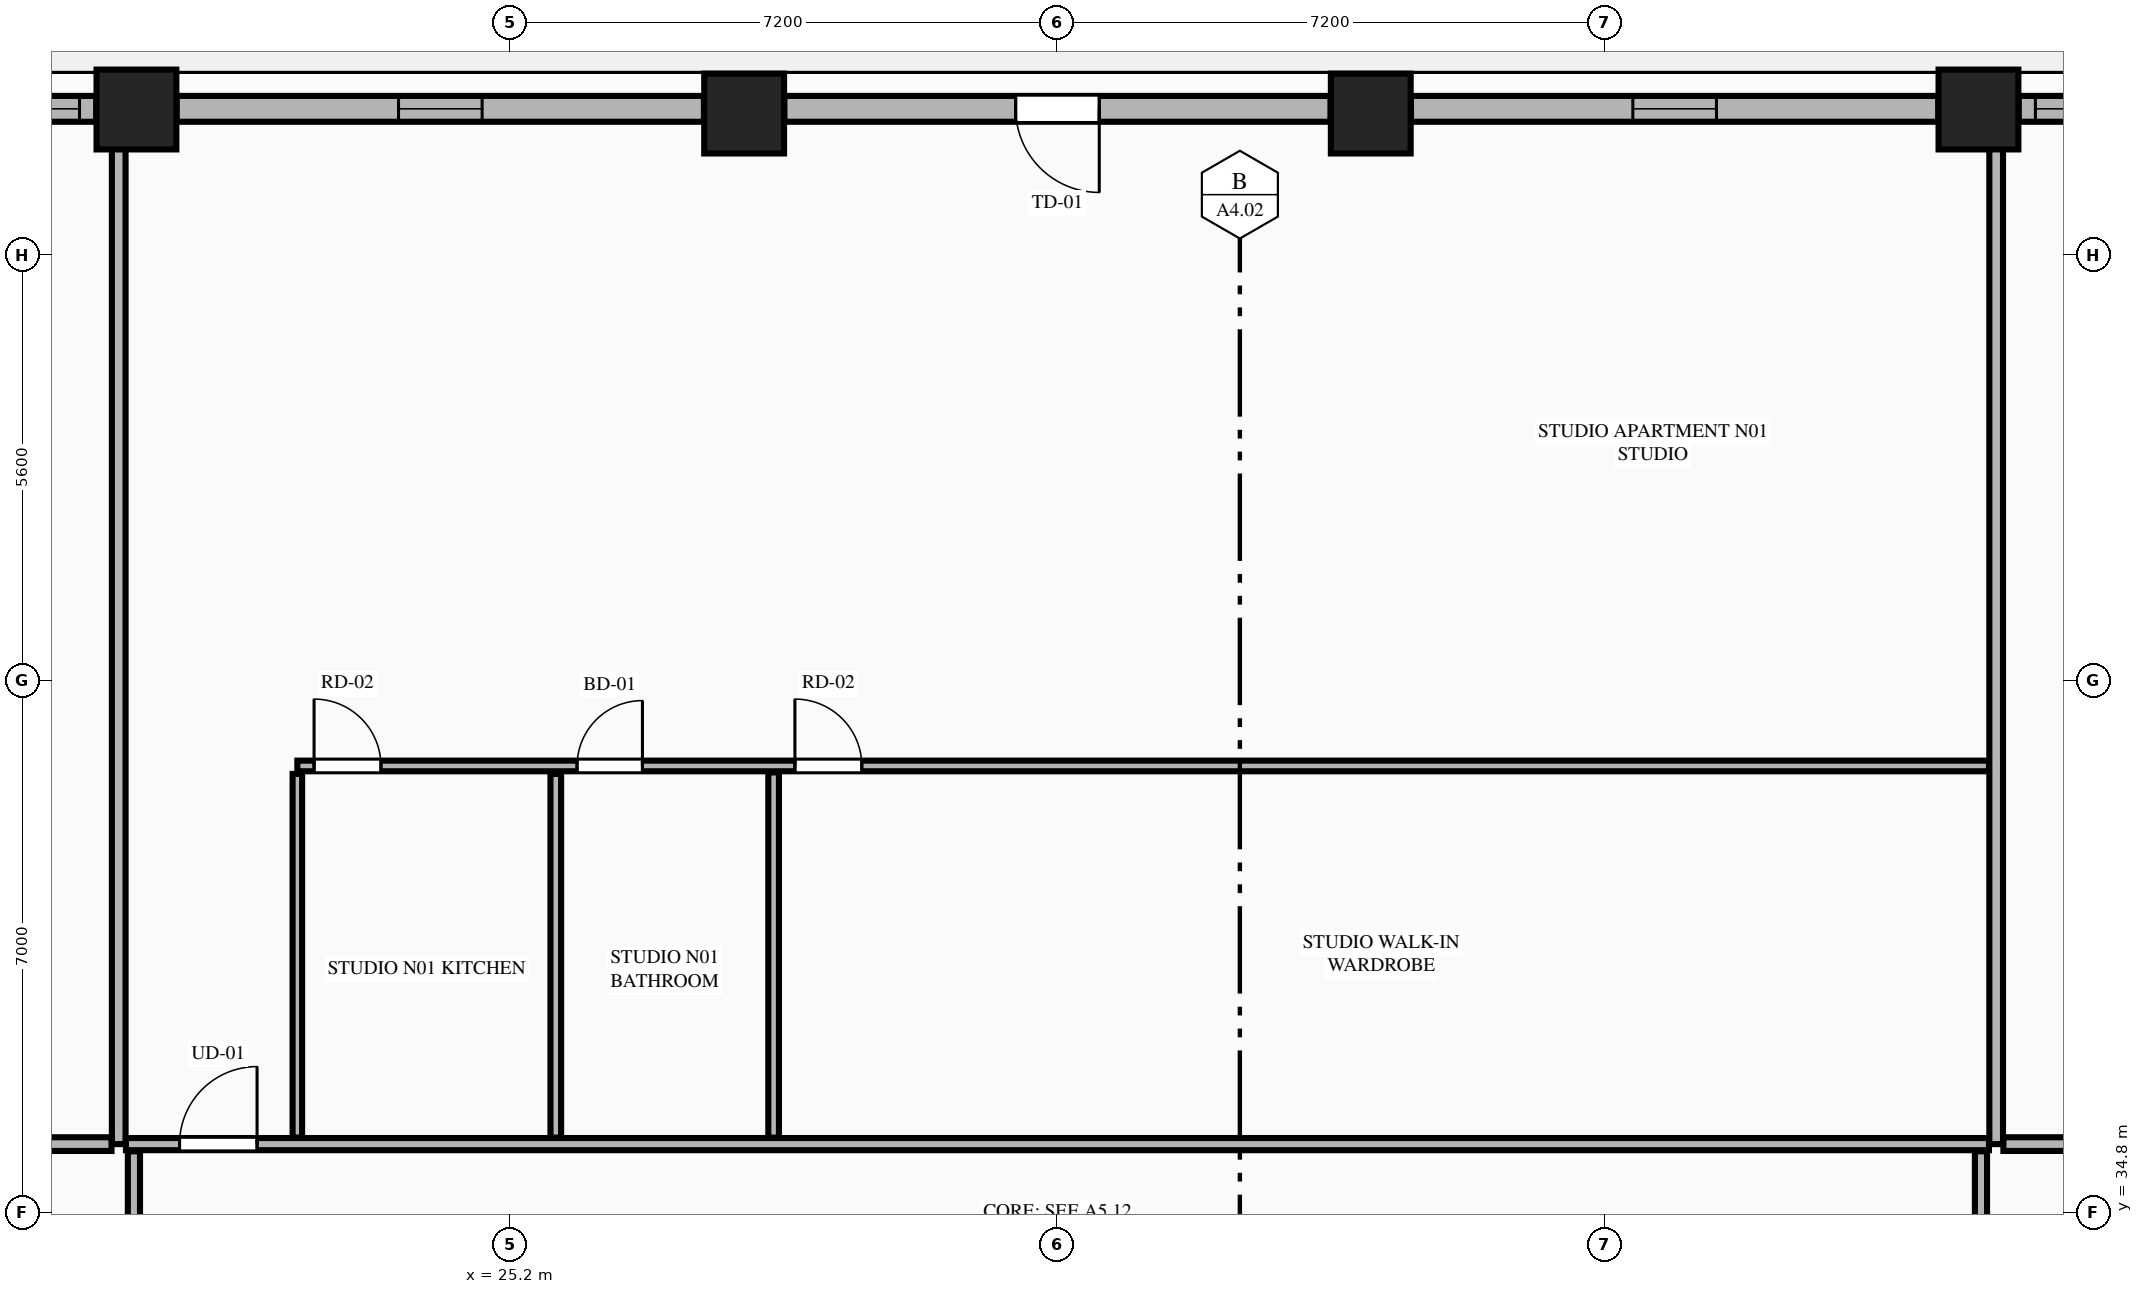
"""IFC4 building model, lengths in metres.
Left out: names, types, materials, properties, quantities, classifications, styles, units other than length and angle.
Written with IfcOpenShell. Run it as: python <this file> out.ifc"""

import sys

from ifc_helpers import new_model, si_unit, direction, frame, frame_2d, origin, origin_2d, place, context, subcontext, project, spatial, rectangle, extrude, element, fill, save


model = new_model("IFC4")
c1 = context("Model", 3, precision=1e-05, world=origin(), true_north=direction((0.0, 1.0)))
c2 = subcontext(c1, "Body", "Model", "MODEL_VIEW")
j1 = project(units=[si_unit("LENGTHUNIT", "METRE"), si_unit("PLANEANGLEUNIT", "RADIAN")], contexts=[c1])
p1 = place(None, origin())
s1 = spatial("IfcSite", under=j1, at=p1, CompositionType="ELEMENT")
p2 = place(p1, origin())
s2 = spatial("IfcBuilding", under=s1, at=p2, CompositionType="ELEMENT")
p3 = place(p2, frame((0.0, 0.0, 87.1)))
s3 = spatial("IfcBuildingStorey", under=s2, at=p3, CompositionType="ELEMENT", Elevation=87.1)
for number, where, z_axis, x_axis in (
    (1, (44.517, 49.311, 0.0), (0.0, 0.0, 1.0), (1.0, 0.0, 0.0)),
    (2, (36.522, 49.258, 0.0), (0.0, 0.0, 1.0), (1.0, 0.0, 0.0)),
    (3, (28.278, 49.258, 0.0), (0.0, 0.0, 1.0), (1.0, 0.0, 0.0)),
    (4, (20.283, 49.311, 0.0), (0.0, 0.0, 1.0), (1.0, 0.0, 0.0)),
):
    element("IfcColumn", number, at=place(p3, frame(where, z_axis=z_axis, x_axis=x_axis)), inside=s3, PredefinedType="COLUMN", context=c2, shape_type="SweptSolid", body=[
        extrude(rectangle(XDim=1.05, YDim=1.05, at=origin_2d()), origin(), (0.0, 0.0, 1.0), 3.55),
    ])
p4 = place(p3, frame((46.366, 49.32, 0.0), z_axis=(0.0, 0.0, 1.0), x_axis=(-1.0, 0.0, 0.0)))
e5 = element("IfcWall", 5, at=p4, inside=s3, PredefinedType="STANDARD", context=c2, shape_type="SweptSolid", body=[
    extrude(rectangle(XDim=1.32, YDim=0.34, at=frame_2d((0.66, 0.0))), origin(), (0.0, 0.0, 1.0), 3.33),
])
p5 = place(p4, frame((0.22, 0.0, 0.75)))
e6 = element("IfcOpeningElement", 6, at=p5, cuts=e5, PredefinedType="OPENING", context=c2, shape_type="SweptSolid", body=[
    extrude(rectangle(XDim=0.88, YDim=2.0, at=frame_2d((0.44, 1.0))), frame((0.0, 0.18, 0.0), z_axis=(0.0, -1.0, 0.0), x_axis=(1.0, 0.0, 0.0)), (0.0, 0.0, 1.0), 0.36),
])
p6 = place(p3, frame((43.988, 49.32, 0.0), z_axis=(0.0, 0.0, 1.0), x_axis=(-1.0, 0.0, 0.0)))
e7 = element("IfcWall", 7, at=p6, inside=s3, PredefinedType="STANDARD", context=c2, shape_type="SweptSolid", body=[
    extrude(rectangle(XDim=6.937, YDim=0.34, at=frame_2d((3.469, 0.0))), origin(), (0.0, 0.0, 1.0), 2.787),
])
p7 = place(p6, frame((2.918, 0.0, 0.75)))
e8 = element("IfcOpeningElement", 8, at=p7, cuts=e7, PredefinedType="OPENING", context=c2, shape_type="SweptSolid", body=[
    extrude(rectangle(XDim=1.1, YDim=1.887, at=frame_2d((0.55, 0.943))), frame((0.0, 0.18, 0.0), z_axis=(0.0, -1.0, 0.0), x_axis=(1.0, 0.0, 0.0)), (0.0, 0.0, 1.0), 0.36),
])
p8 = place(p3, frame((35.993, 49.32, 0.0), z_axis=(0.0, 0.0, 1.0), x_axis=(-1.0, 0.0, 0.0)))
e9 = element("IfcWall", 9, at=p8, inside=s3, PredefinedType="STANDARD", context=c2, shape_type="SweptSolid", body=[
    extrude(rectangle(XDim=7.186, YDim=0.34, at=frame_2d((3.593, 0.0))), origin(), (0.0, 0.0, 1.0), 2.787),
])
p9 = place(p8, frame((3.043, 0.0, 0.0)))
e10 = element("IfcOpeningElement", 10, at=p9, cuts=e9, PredefinedType="OPENING", context=c2, shape_type="SweptSolid", body=[
    extrude(rectangle(XDim=1.1, YDim=2.25, at=frame_2d((0.55, 1.125))), frame((0.0, 0.18, 0.0), z_axis=(0.0, -1.0, 0.0), x_axis=(1.0, 0.0, 0.0)), (0.0, 0.0, 1.0), 0.36),
])
p10 = place(p3, frame((27.749, 49.32, 0.0), z_axis=(0.0, 0.0, 1.0), x_axis=(-1.0, 0.0, 0.0)))
e11 = element("IfcWall", 11, at=p10, inside=s3, PredefinedType="STANDARD", context=c2, shape_type="SweptSolid", body=[
    extrude(rectangle(XDim=6.937, YDim=0.34, at=frame_2d((3.469, 0.0))), origin(), (0.0, 0.0, 1.0), 2.787),
])
p11 = place(p10, frame((2.918, 0.0, 0.75)))
e12 = element("IfcOpeningElement", 12, at=p11, cuts=e11, PredefinedType="OPENING", context=c2, shape_type="SweptSolid", body=[
    extrude(rectangle(XDim=1.1, YDim=1.887, at=frame_2d((0.55, 0.943))), frame((0.0, 0.18, 0.0), z_axis=(0.0, -1.0, 0.0), x_axis=(1.0, 0.0, 0.0)), (0.0, 0.0, 1.0), 0.36),
])
p12 = place(p3, frame((19.754, 49.32, 0.0), z_axis=(0.0, 0.0, 1.0), x_axis=(-1.0, 0.0, 0.0)))
e13 = element("IfcWall", 13, at=p12, inside=s3, PredefinedType="STANDARD", context=c2, shape_type="SweptSolid", body=[
    extrude(rectangle(XDim=1.32, YDim=0.34, at=frame_2d((0.66, 0.0))), origin(), (0.0, 0.0, 1.0), 3.33),
])
p13 = place(p12, frame((0.22, 0.0, 0.75)))
e14 = element("IfcOpeningElement", 14, at=p13, cuts=e13, PredefinedType="OPENING", context=c2, shape_type="SweptSolid", body=[
    extrude(rectangle(XDim=0.88, YDim=2.0, at=frame_2d((0.44, 1.0))), frame((0.0, 0.18, 0.0), z_axis=(0.0, -1.0, 0.0), x_axis=(1.0, 0.0, 0.0)), (0.0, 0.0, 1.0), 0.36),
])
for number, where, z_axis, x_axis in (
    (15, (20.05, 35.7, 0.0), (0.0, 0.0, 1.0), (0.0, 1.0, 0.0)),
    (16, (44.75, 35.7, 0.0), (0.0, 0.0, 1.0), (0.0, 1.0, 0.0)),
):
    element("IfcWall", number, at=place(p3, frame(where, z_axis=z_axis, x_axis=x_axis)), inside=s3, PredefinedType="PARTITIONING", context=c2, shape_type="SweptSolid", body=[
        extrude(rectangle(XDim=13.445, YDim=0.18, at=frame_2d((6.723, 0.0))), origin(), (0.0, 0.0, 1.0), 3.33),
    ])
p14 = place(p3, frame((20.145, 35.7, 0.0), z_axis=(0.0, 0.0, 1.0), x_axis=(1.0, 0.0, 0.0)))
e17 = element("IfcWall", 17, at=p14, inside=s3, PredefinedType="PARTITIONING", context=c2, shape_type="SweptSolid", body=[
    extrude(rectangle(XDim=24.51, YDim=0.16, at=frame_2d((12.255, 0.0))), origin(), (0.0, 0.0, 1.0), 3.33),
])
p15 = place(p14, frame((0.705, 0.0, 0.0)))
e18 = element("IfcOpeningElement", 18, at=p15, cuts=e17, PredefinedType="OPENING", context=c2, shape_type="SweptSolid", body=[
    extrude(rectangle(XDim=1.02, YDim=2.25, at=frame_2d((0.51, 1.125))), frame((0.0, 0.09, 0.0), z_axis=(0.0, -1.0, 0.0), x_axis=(1.0, 0.0, 0.0)), (0.0, 0.0, 1.0), 0.18),
])
p16 = place(p3, frame((22.4, 35.785, 0.0), z_axis=(0.0, 0.0, 1.0), x_axis=(0.0, 1.0, 0.0)))
e19 = element("IfcWall", 19, at=p16, inside=s3, PredefinedType="PARTITIONING", context=c2, shape_type="SweptSolid", body=[
    extrude(rectangle(XDim=4.785, YDim=0.125, at=frame_2d((2.393, 0.0))), origin(), (0.0, 0.0, 1.0), 2.7),
])
p17 = place(p3, frame((22.4, 40.675, 0.0), z_axis=(0.0, 0.0, 1.0), x_axis=(1.0, 0.0, 0.0)))
e20 = element("IfcWall", 20, at=p17, inside=s3, PredefinedType="PLUMBINGWALL", context=c2, shape_type="SweptSolid", body=[
    extrude(rectangle(XDim=22.255, YDim=0.14, at=frame_2d((11.127, 0.0))), origin(), (0.0, 0.0, 1.0), 3.33),
])
p18 = place(p17, frame((3.68, 0.0, 0.0)))
e21 = element("IfcOpeningElement", 21, at=p18, cuts=e20, PredefinedType="OPENING", context=c2, shape_type="SweptSolid", body=[
    extrude(rectangle(XDim=0.86, YDim=2.1, at=frame_2d((0.43, 1.05))), frame((0.0, 0.08, 0.0), z_axis=(0.0, -1.0, 0.0), x_axis=(1.0, 0.0, 0.0)), (0.0, 0.0, 1.0), 0.16),
])
p19 = place(p17, frame((6.546, 0.0, 0.0)))
e22 = element("IfcOpeningElement", 22, at=p19, cuts=e20, PredefinedType="OPENING", context=c2, shape_type="SweptSolid", body=[
    extrude(rectangle(XDim=0.88, YDim=2.15, at=frame_2d((0.44, 1.075))), frame((0.0, 0.08, 0.0), z_axis=(0.0, -1.0, 0.0), x_axis=(1.0, 0.0, 0.0)), (0.0, 0.0, 1.0), 0.16),
])
p20 = place(p17, frame((0.22, 0.0, 0.0)))
e23 = element("IfcOpeningElement", 23, at=p20, cuts=e20, PredefinedType="OPENING", context=c2, shape_type="SweptSolid", body=[
    extrude(rectangle(XDim=0.88, YDim=2.15, at=frame_2d((0.44, 1.075))), frame((0.0, 0.08, 0.0), z_axis=(0.0, -1.0, 0.0), x_axis=(1.0, 0.0, 0.0)), (0.0, 0.0, 1.0), 0.16),
])
p21 = place(p3, frame((25.8, 35.785, 0.0), z_axis=(0.0, 0.0, 1.0), x_axis=(0.0, 1.0, 0.0)))
e24 = element("IfcWall", 24, at=p21, inside=s3, PredefinedType="PLUMBINGWALL", context=c2, shape_type="SweptSolid", body=[
    extrude(rectangle(XDim=4.785, YDim=0.14, at=frame_2d((2.393, 0.0))), origin(), (0.0, 0.0, 1.0), 3.33),
])
p22 = place(p3, frame((28.666, 35.785, 0.0), z_axis=(0.0, 0.0, 1.0), x_axis=(0.0, 1.0, 0.0)))
e25 = element("IfcWall", 25, at=p22, inside=s3, PredefinedType="PLUMBINGWALL", context=c2, shape_type="SweptSolid", body=[
    extrude(rectangle(XDim=4.805, YDim=0.14, at=frame_2d((2.403, 0.0))), origin(), (0.0, 0.0, 1.0), 3.33),
])
for number, where, z_axis, x_axis in (
    (26, (10.589, 35.7, 0.0), (0.0, 0.0, 1.0), (1.0, 0.0, 0.0)),
    (27, (44.845, 35.7, 0.0), (0.0, 0.0, 1.0), (1.0, 0.0, 0.0)),
):
    element("IfcWall", number, at=place(p3, frame(where, z_axis=z_axis, x_axis=x_axis)), inside=s3, PredefinedType="PARTITIONING", context=c2, shape_type="SweptSolid", body=[
        extrude(rectangle(XDim=9.366, YDim=0.18, at=frame_2d((4.683, 0.0))), origin(), (0.0, 0.0, 1.0), 3.33),
    ])
p23 = place(p3, frame((20.25, 25.603, 0.0), z_axis=(0.0, 0.0, 1.0), x_axis=(0.0, 1.0, 0.0)))
e28 = element("IfcWall", 28, at=p23, inside=s3, PredefinedType="PARTITIONING", context=c2, shape_type="SweptSolid", body=[
    extrude(rectangle(XDim=10.002, YDim=0.16, at=frame_2d((5.001, 0.0))), origin(), (0.0, 0.0, 1.0), 2.7),
])
p24 = place(p23, frame((0.45, 0.0, 0.0)))
e29 = element("IfcOpeningElement", 29, at=p24, cuts=e28, PredefinedType="OPENING", context=c2, shape_type="SweptSolid", body=[
    extrude(rectangle(XDim=1.02, YDim=2.25, at=frame_2d((0.51, 1.125))), frame((0.0, 0.09, 0.0), z_axis=(0.0, -1.0, 0.0), x_axis=(1.0, 0.0, 0.0)), (0.0, 0.0, 1.0), 0.18),
])
p25 = place(p3, frame((44.55, 16.195, 0.0), z_axis=(0.0, 0.0, 1.0), x_axis=(0.0, 1.0, 0.0)))
e30 = element("IfcWall", 30, at=p25, inside=s3, PredefinedType="PARTITIONING", context=c2, shape_type="SweptSolid", body=[
    extrude(rectangle(XDim=19.41, YDim=0.16, at=frame_2d((9.705, 0.0))), origin(), (0.0, 0.0, 1.0), 2.7),
])
p26 = place(p25, frame((0.4, 0.0, 0.0)))
e31 = element("IfcOpeningElement", 31, at=p26, cuts=e30, PredefinedType="OPENING", context=c2, shape_type="SweptSolid", body=[
    extrude(rectangle(XDim=1.02, YDim=2.25, at=frame_2d((0.51, 1.125))), frame((0.0, 0.09, 0.0), z_axis=(0.0, -1.0, 0.0), x_axis=(1.0, 0.0, 0.0)), (0.0, 0.0, 1.0), 0.18),
])
p27 = place(p7, origin())
e32 = element("IfcWindow", 32, at=p27, inside=s3, PartitioningType="SINGLE_PANEL", PredefinedType="WINDOW", context=c2, shape_type="SweptSolid", body=[
    extrude(rectangle(XDim=1.1, YDim=1.887, at=frame_2d((0.55, 0.943))), frame((0.0, 0.03, 0.0), z_axis=(0.0, -1.0, 0.0), x_axis=(1.0, 0.0, 0.0)), (0.0, 0.0, 1.0), 0.06),
])
fill(e8, e32)
p28 = place(p9, origin())
e33 = element("IfcDoor", 33, at=p28, inside=s3, OperationType="SINGLE_SWING_LEFT", PredefinedType="DOOR", context=c2, shape_type="SweptSolid", body=[
    extrude(rectangle(XDim=1.1, YDim=2.25, at=frame_2d((0.55, 1.125))), frame((0.0, 0.025, 0.0), z_axis=(0.0, -1.0, 0.0), x_axis=(1.0, 0.0, 0.0)), (0.0, 0.0, 1.0), 0.05),
])
fill(e10, e33)
p29 = place(p11, origin())
e34 = element("IfcWindow", 34, at=p29, inside=s3, PartitioningType="SINGLE_PANEL", PredefinedType="WINDOW", context=c2, shape_type="SweptSolid", body=[
    extrude(rectangle(XDim=1.1, YDim=1.887, at=frame_2d((0.55, 0.943))), frame((0.0, 0.03, 0.0), z_axis=(0.0, -1.0, 0.0), x_axis=(1.0, 0.0, 0.0)), (0.0, 0.0, 1.0), 0.06),
])
fill(e12, e34)
p30 = place(p18, origin())
e35 = element("IfcDoor", 35, at=p30, inside=s3, OperationType="SINGLE_SWING_RIGHT", PredefinedType="DOOR", context=c2, shape_type="SweptSolid", body=[
    extrude(rectangle(XDim=0.86, YDim=2.1, at=frame_2d((0.43, 1.05))), frame((0.0, 0.025, 0.0), z_axis=(0.0, -1.0, 0.0), x_axis=(1.0, 0.0, 0.0)), (0.0, 0.0, 1.0), 0.05),
])
fill(e21, e35)
p31 = place(p19, origin())
e36 = element("IfcDoor", 36, at=p31, inside=s3, OperationType="SINGLE_SWING_LEFT", PredefinedType="DOOR", context=c2, shape_type="SweptSolid", body=[
    extrude(rectangle(XDim=0.88, YDim=2.15, at=frame_2d((0.44, 1.075))), frame((0.0, 0.025, 0.0), z_axis=(0.0, -1.0, 0.0), x_axis=(1.0, 0.0, 0.0)), (0.0, 0.0, 1.0), 0.05),
])
fill(e22, e36)
p32 = place(p15, origin())
e37 = element("IfcDoor", 37, at=p32, inside=s3, OperationType="SINGLE_SWING_RIGHT", PredefinedType="DOOR", context=c2, shape_type="SweptSolid", body=[
    extrude(rectangle(XDim=1.02, YDim=2.25, at=frame_2d((0.51, 1.125))), frame((0.0, 0.025, 0.0), z_axis=(0.0, -1.0, 0.0), x_axis=(1.0, 0.0, 0.0)), (0.0, 0.0, 1.0), 0.05),
])
fill(e18, e37)
p33 = place(p20, origin())
e38 = element("IfcDoor", 38, at=p33, inside=s3, OperationType="SINGLE_SWING_LEFT", PredefinedType="DOOR", context=c2, shape_type="SweptSolid", body=[
    extrude(rectangle(XDim=0.88, YDim=2.15, at=frame_2d((0.44, 1.075))), frame((0.0, 0.025, 0.0), z_axis=(0.0, -1.0, 0.0), x_axis=(1.0, 0.0, 0.0)), (0.0, 0.0, 1.0), 0.05),
])
fill(e23, e38)
p34 = place(p5, origin())
e39 = element("IfcWindow", 39, at=p34, inside=s3, PartitioningType="SINGLE_PANEL", PredefinedType="WINDOW", context=c2, shape_type="SweptSolid", body=[
    extrude(rectangle(XDim=0.88, YDim=2.0, at=frame_2d((0.44, 1.0))), frame((0.0, 0.03, 0.0), z_axis=(0.0, -1.0, 0.0), x_axis=(1.0, 0.0, 0.0)), (0.0, 0.0, 1.0), 0.06),
])
fill(e6, e39)
p35 = place(p13, origin())
e40 = element("IfcWindow", 40, at=p35, inside=s3, PartitioningType="SINGLE_PANEL", PredefinedType="WINDOW", context=c2, shape_type="SweptSolid", body=[
    extrude(rectangle(XDim=0.88, YDim=2.0, at=frame_2d((0.44, 1.0))), frame((0.0, 0.03, 0.0), z_axis=(0.0, -1.0, 0.0), x_axis=(1.0, 0.0, 0.0)), (0.0, 0.0, 1.0), 0.06),
])
fill(e14, e40)
save(model, sys.argv[1])
